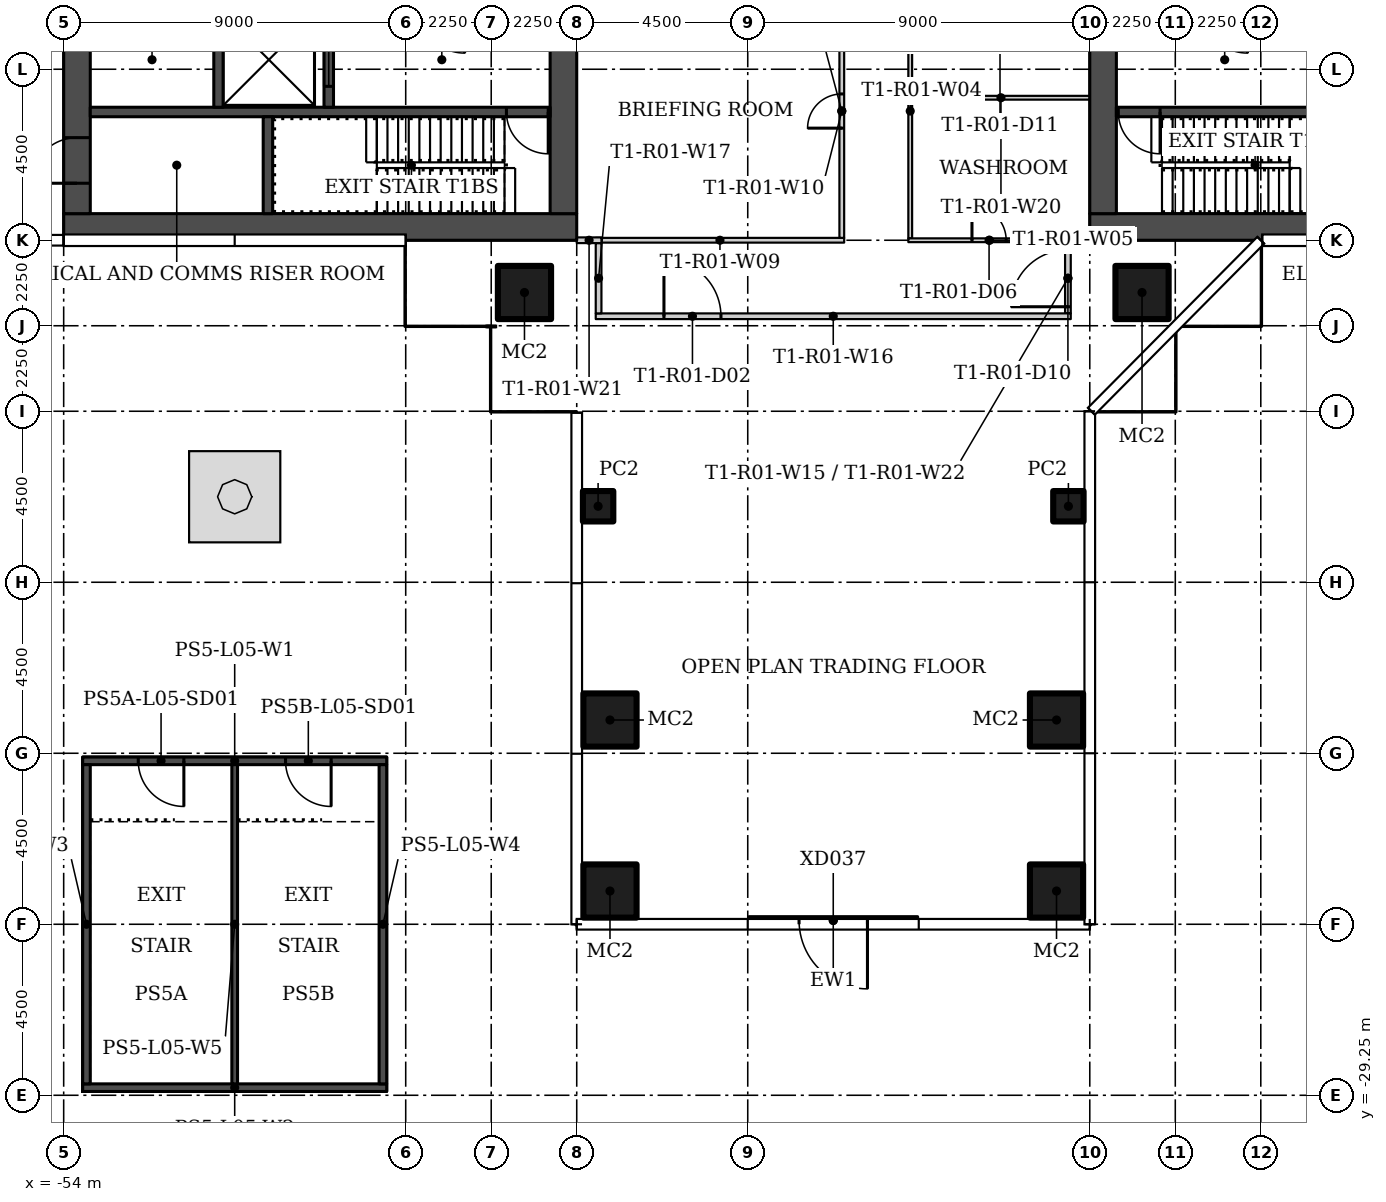
"""IFC4 building model, lengths in metres.
Left out: names, types, materials, properties, quantities, classifications, styles, units other than length and angle.
Written with IfcOpenShell. Run it as: python <this file> out.ifc"""

import sys

from ifc_helpers import new_model, si_unit, direction, frame, frame_2d, origin, origin_2d, place, context, subcontext, project, spatial, rectangle, hollow_rectangle, extrude, element, fill, save


model = new_model("IFC4")
c1 = context("Model", 3, precision=1e-05, world=origin(), true_north=direction((0.0, 1.0)))
c2 = subcontext(c1, "Body", "Model", "MODEL_VIEW")
j1 = project(units=[si_unit("LENGTHUNIT", "METRE"), si_unit("PLANEANGLEUNIT", "RADIAN")], contexts=[c1])
p1 = place(None, origin())
s1 = spatial("IfcSite", under=j1, at=p1, CompositionType="ELEMENT")
p2 = place(p1, origin())
s2 = spatial("IfcBuilding", under=s1, at=p2, CompositionType="ELEMENT")
p3 = place(p2, frame((0.0, 0.0, 28.5)))
s3 = spatial("IfcBuildingStorey", under=s2, at=p3, CompositionType="ELEMENT", Elevation=28.5)
for number, where in (
    (1, (-25.625, -8.125, 0.0)),
    (2, (-41.875, -8.125, 0.0)),
):
    element("IfcColumn", number, at=place(p3, frame(where)), inside=s3, PredefinedType="COLUMN", context=c2, shape_type="SweptSolid", body=[
        extrude(hollow_rectangle(XDim=1.4, YDim=1.4, WallThickness=0.05, at=origin_2d()), origin(), (0.0, 0.0, 1.0), 4.15),
    ])
p4 = place(p3, frame((-39.938, -13.75, 0.0)))
e3 = element("IfcColumn", 3, at=p4, inside=s3, PredefinedType="COLUMN", context=c2, shape_type="SweptSolid", body=[
    extrude(hollow_rectangle(XDim=0.8, YDim=0.8, WallThickness=0.025, at=origin_2d()), origin(), (0.0, 0.0, 1.0), 4.15),
])
for number, where in (
    (4, (-39.625, -19.375, 0.0)),
    (5, (-39.625, -23.875, 0.0)),
):
    element("IfcColumn", number, at=place(p3, frame(where)), inside=s3, PredefinedType="COLUMN", context=c2, shape_type="SweptSolid", body=[
        extrude(hollow_rectangle(XDim=1.4, YDim=1.4, WallThickness=0.05, at=origin_2d()), origin(), (0.0, 0.0, 1.0), 4.15),
    ])
p5 = place(p3, frame((-27.562, -13.75, 0.0)))
e6 = element("IfcColumn", 6, at=p5, inside=s3, PredefinedType="COLUMN", context=c2, shape_type="SweptSolid", body=[
    extrude(hollow_rectangle(XDim=0.8, YDim=0.8, WallThickness=0.025, at=origin_2d()), origin(), (0.0, 0.0, 1.0), 4.15),
])
for number, where in (
    (7, (-27.875, -19.375, 0.0)),
    (8, (-27.875, -23.875, 0.0)),
):
    element("IfcColumn", number, at=place(p3, frame(where)), inside=s3, PredefinedType="COLUMN", context=c2, shape_type="SweptSolid", body=[
        extrude(hollow_rectangle(XDim=1.4, YDim=1.4, WallThickness=0.05, at=origin_2d()), origin(), (0.0, 0.0, 1.0), 4.15),
    ])
p6 = place(p3, frame((-31.725, -0.0, 0.0), z_axis=(0.0, 0.0, 1.0), x_axis=(0.0, -1.0, 0.0)))
e9 = element("IfcWall", 9, at=p6, inside=s3, PredefinedType="PARTITIONING", context=c2, shape_type="SweptSolid", body=[
    extrude(rectangle(XDim=6.7, YDim=0.1, at=frame_2d((3.35, 0.0))), origin(), (0.0, 0.0, 1.0), 4.15),
])
p7 = place(p3, frame((-31.775, -6.75, 0.0)))
e10 = element("IfcWall", 10, at=p7, inside=s3, PredefinedType="PARTITIONING", context=c2, shape_type="SweptSolid", body=[
    extrude(rectangle(XDim=4.274, YDim=0.1, at=frame_2d((2.137, 0.0))), origin(), (0.0, 0.0, 1.0), 4.15),
])
p8 = place(p7, frame((1.675, 0.0, 0.0)))
e11 = element("IfcOpeningElement", 11, at=p8, cuts=e10, PredefinedType="OPENING", context=c2, shape_type="SweptSolid", body=[
    extrude(rectangle(XDim=0.9, YDim=2.1, at=frame_2d((0.45, 1.05))), frame((0.0, 0.06, 0.0), z_axis=(0.0, -1.0, 0.0), x_axis=(1.0, 0.0, 0.0)), (0.0, 0.0, 1.0), 0.12),
])
p9 = place(p3, frame((-40.0, -6.75, 0.0)))
e12 = element("IfcWall", 12, at=p9, inside=s3, PredefinedType="PARTITIONING", context=c2, shape_type="SweptSolid", body=[
    extrude(rectangle(XDim=6.537, YDim=0.125, at=frame_2d((3.269, 0.0))), origin(), (0.0, 0.0, 1.0), 4.15),
])
p10 = place(p3, frame((-33.525, -6.688, 0.0), z_axis=(0.0, 0.0, 1.0), x_axis=(0.0, 1.0, 0.0)))
e13 = element("IfcWall", 13, at=p10, inside=s3, PredefinedType="PARTITIONING", context=c2, shape_type="SweptSolid", body=[
    extrude(rectangle(XDim=6.675, YDim=0.125, at=frame_2d((3.337, 0.0))), origin(), (0.0, 0.0, 1.0), 4.15),
])
p11 = place(p10, frame((2.887, 0.0, 0.0)))
e14 = element("IfcOpeningElement", 14, at=p11, cuts=e13, PredefinedType="OPENING", context=c2, shape_type="SweptSolid", body=[
    extrude(rectangle(XDim=0.9, YDim=2.1, at=frame_2d((0.45, 1.05))), frame((0.0, 0.073, 0.0), z_axis=(0.0, -1.0, 0.0), x_axis=(1.0, 0.0, 0.0)), (0.0, 0.0, 1.0), 0.145),
])
p12 = place(p3, frame((-27.575, -8.675, 0.0), z_axis=(0.0, 0.0, 1.0), x_axis=(0.0, 1.0, 0.0)))
e15 = element("IfcWall", 15, at=p12, inside=s3, PredefinedType="PARTITIONING", context=c2, shape_type="SweptSolid", body=[
    extrude(rectangle(XDim=1.85, YDim=0.15, at=frame_2d((0.925, 0.0))), origin(), (0.0, 0.0, 1.0), 4.15),
])
p13 = place(p12, frame((0.175, 0.0, 0.0)))
e16 = element("IfcOpeningElement", 16, at=p13, cuts=e15, PredefinedType="OPENING", context=c2, shape_type="SweptSolid", body=[
    extrude(rectangle(XDim=1.5, YDim=2.4, at=frame_2d((0.75, 1.2))), frame((0.0, 0.085, 0.0), z_axis=(0.0, -1.0, 0.0), x_axis=(1.0, 0.0, 0.0)), (0.0, 0.0, 1.0), 0.17),
])
p14 = place(p3, frame((-40.0, -8.75, 0.0)))
e17 = element("IfcWall", 17, at=p14, inside=s3, PredefinedType="PARTITIONING", context=c2, shape_type="SweptSolid", body=[
    extrude(rectangle(XDim=12.5, YDim=0.15, at=frame_2d((6.25, 0.0))), origin(), (0.0, 0.0, 1.0), 4.15),
])
p15 = place(p14, frame((1.795, 0.0, 0.0)))
e18 = element("IfcOpeningElement", 18, at=p15, cuts=e17, PredefinedType="OPENING", context=c2, shape_type="SweptSolid", body=[
    extrude(rectangle(XDim=1.5, YDim=2.4, at=frame_2d((0.75, 1.2))), frame((0.0, 0.085, 0.0), z_axis=(0.0, -1.0, 0.0), x_axis=(1.0, 0.0, 0.0)), (0.0, 0.0, 1.0), 0.17),
])
p16 = place(p3, frame((-39.925, -6.825, 0.0), z_axis=(0.0, 0.0, 1.0), x_axis=(0.0, -1.0, 0.0)))
e19 = element("IfcWall", 19, at=p16, inside=s3, PredefinedType="PARTITIONING", context=c2, shape_type="SweptSolid", body=[
    extrude(rectangle(XDim=1.85, YDim=0.15, at=frame_2d((0.925, 0.0))), origin(), (0.0, 0.0, 1.0), 4.15),
])
p17 = place(p3, frame((-27.0, -3.0, 0.0), z_axis=(0.0, 0.0, 1.0), x_axis=(-1.0, 0.0, 0.0)))
e20 = element("IfcWall", 20, at=p17, inside=s3, PredefinedType="PARTITIONING", context=c2, shape_type="SweptSolid", body=[
    extrude(rectangle(XDim=4.675, YDim=0.1, at=frame_2d((2.337, 0.0))), origin(), (0.0, 0.0, 1.0), 4.15),
])
for number, where in (
    (21, (-40.5, -6.75, 0.0)),
    (22, (-27.65, -6.75, 0.0)),
):
    element("IfcWall", number, at=place(p3, frame(where)), inside=s3, PredefinedType="PARTITIONING", context=c2, shape_type="SweptSolid", body=[
        extrude(rectangle(XDim=0.65, YDim=0.15, at=frame_2d((0.325, 0.0))), origin(), (0.0, 0.0, 1.0), 4.15),
    ])
p18 = place(p3, frame((-31.53, -24.65, 0.0), z_axis=(0.0, 0.0, 1.0), x_axis=(-1.0, 0.0, 0.0)))
e23 = element("IfcWall", 23, at=p18, inside=s3, PredefinedType="SOLIDWALL", context=c2, shape_type="SweptSolid", body=[
    extrude(rectangle(XDim=4.44, YDim=0.2, at=frame_2d((2.22, 0.0))), origin(), (0.0, 0.0, 1.0), 3.0),
])
p19 = place(p18, frame((1.32, 0.0, 0.0)))
e24 = element("IfcOpeningElement", 24, at=p19, cuts=e23, PredefinedType="OPENING", context=c2, shape_type="SweptSolid", body=[
    extrude(rectangle(XDim=1.8, YDim=2.4, at=frame_2d((0.9, 1.2))), frame((0.0, 0.11, 0.0), z_axis=(0.0, -1.0, 0.0), x_axis=(1.0, 0.0, 0.0)), (0.0, 0.0, 1.0), 0.22),
])
p20 = place(p3, frame((-27.0, -6.4, 0.0)))
e25 = element("IfcWall", 25, at=p20, inside=s3, PredefinedType="SHEAR", context=c2, shape_type="SweptSolid", body=[
    extrude(rectangle(XDim=13.5, YDim=0.7, at=frame_2d((6.75, 0.0))), origin(), (0.0, 0.0, 1.0), 4.15),
])
p21 = place(p3, frame((-26.65, 6.05, 0.0), z_axis=(0.0, 0.0, 1.0), x_axis=(0.0, -1.0, 0.0)))
e26 = element("IfcWall", 26, at=p21, inside=s3, PredefinedType="SHEAR", context=c2, shape_type="SweptSolid", body=[
    extrude(rectangle(XDim=12.1, YDim=0.7, at=frame_2d((6.05, 0.0))), origin(), (0.0, 0.0, 1.0), 4.15),
])
p22 = place(p21, frame((3.9, 0.0, 0.0)))
e27 = element("IfcOpeningElement", 27, at=p22, cuts=e26, PredefinedType="OPENING", context=c2, shape_type="SweptSolid", body=[
    extrude(rectangle(XDim=1.8, YDim=2.4, at=frame_2d((0.9, 1.2))), frame((0.0, 0.36, 0.0), z_axis=(0.0, -1.0, 0.0), x_axis=(1.0, 0.0, 0.0)), (0.0, 0.0, 1.0), 0.72),
])
p23 = place(p3, frame((-14.2, -3.375, 0.0), z_axis=(0.0, 0.0, 1.0), x_axis=(-1.0, 0.0, 0.0)))
e28 = element("IfcWall", 28, at=p23, inside=s3, PredefinedType="SHEAR", context=c2, shape_type="SweptSolid", body=[
    extrude(rectangle(XDim=12.1, YDim=0.25, at=frame_2d((6.05, 0.0))), origin(), (0.0, 0.0, 1.0), 4.15),
])
p24 = place(p23, frame((10.95, 0.0, 0.0)))
e29 = element("IfcOpeningElement", 29, at=p24, cuts=e28, PredefinedType="OPENING", context=c2, shape_type="SweptSolid", body=[
    extrude(rectangle(XDim=1.1, YDim=2.1, at=frame_2d((0.55, 1.05))), frame((0.0, 0.135, 0.0), z_axis=(0.0, -1.0, 0.0), x_axis=(1.0, 0.0, 0.0)), (0.0, 0.0, 1.0), 0.27),
])
p25 = place(p3, frame((-40.5, -6.4, 0.0), z_axis=(0.0, 0.0, 1.0), x_axis=(-1.0, 0.0, 0.0)))
e30 = element("IfcWall", 30, at=p25, inside=s3, PredefinedType="SHEAR", context=c2, shape_type="SweptSolid", body=[
    extrude(rectangle(XDim=13.5, YDim=0.7, at=frame_2d((6.75, 0.0))), origin(), (0.0, 0.0, 1.0), 4.15),
])
p26 = place(p3, frame((-40.85, -6.05, 0.0), z_axis=(0.0, 0.0, 1.0), x_axis=(0.0, 1.0, 0.0)))
e31 = element("IfcWall", 31, at=p26, inside=s3, PredefinedType="SHEAR", context=c2, shape_type="SweptSolid", body=[
    extrude(rectangle(XDim=12.1, YDim=0.7, at=frame_2d((6.05, 0.0))), origin(), (0.0, 0.0, 1.0), 4.15),
])
p27 = place(p26, frame((6.4, 0.0, 0.0)))
e32 = element("IfcOpeningElement", 32, at=p27, cuts=e31, PredefinedType="OPENING", context=c2, shape_type="SweptSolid", body=[
    extrude(rectangle(XDim=1.8, YDim=2.4, at=frame_2d((0.9, 1.2))), frame((0.0, 0.36, 0.0), z_axis=(0.0, -1.0, 0.0), x_axis=(1.0, 0.0, 0.0)), (0.0, 0.0, 1.0), 0.72),
])
p28 = place(p3, frame((-53.65, -6.05, 0.0), z_axis=(0.0, 0.0, 1.0), x_axis=(0.0, 1.0, 0.0)))
e33 = element("IfcWall", 33, at=p28, inside=s3, PredefinedType="SHEAR", context=c2, shape_type="SweptSolid", body=[
    extrude(rectangle(XDim=12.1, YDim=0.7, at=frame_2d((6.05, 0.0))), origin(), (0.0, 0.0, 1.0), 4.15),
])
p29 = place(p28, frame((0.8, 0.0, 0.0)))
e34 = element("IfcOpeningElement", 34, at=p29, cuts=e33, PredefinedType="OPENING", context=c2, shape_type="SweptSolid", body=[
    extrude(rectangle(XDim=1.2, YDim=2.1, at=frame_2d((0.6, 1.05))), frame((0.0, 0.36, 0.0), z_axis=(0.0, -1.0, 0.0), x_axis=(1.0, 0.0, 0.0)), (0.0, 0.0, 1.0), 0.72),
])
p30 = place(p28, frame((6.4, 0.0, 0.0)))
e35 = element("IfcOpeningElement", 35, at=p30, cuts=e33, PredefinedType="OPENING", context=c2, shape_type="SweptSolid", body=[
    extrude(rectangle(XDim=1.8, YDim=2.4, at=frame_2d((0.9, 1.2))), frame((0.0, 0.36, 0.0), z_axis=(0.0, -1.0, 0.0), x_axis=(1.0, 0.0, 0.0)), (0.0, 0.0, 1.0), 0.72),
])
p31 = place(p3, frame((-41.2, -3.375, 0.0), z_axis=(0.0, 0.0, 1.0), x_axis=(-1.0, 0.0, 0.0)))
e36 = element("IfcWall", 36, at=p31, inside=s3, PredefinedType="SHEAR", context=c2, shape_type="SweptSolid", body=[
    extrude(rectangle(XDim=12.1, YDim=0.25, at=frame_2d((6.05, 0.0))), origin(), (0.0, 0.0, 1.0), 4.15),
])
p32 = place(p31, frame((0.05, 0.0, 0.0)))
e37 = element("IfcOpeningElement", 37, at=p32, cuts=e36, PredefinedType="OPENING", context=c2, shape_type="SweptSolid", body=[
    extrude(rectangle(XDim=1.1, YDim=2.1, at=frame_2d((0.55, 1.05))), frame((0.0, 0.135, 0.0), z_axis=(0.0, -1.0, 0.0), x_axis=(1.0, 0.0, 0.0)), (0.0, 0.0, 1.0), 0.27),
])
p33 = place(p3, frame((-48.625, -6.05, 0.0), z_axis=(0.0, 0.0, 1.0), x_axis=(0.0, 1.0, 0.0)))
e38 = element("IfcWall", 38, at=p33, inside=s3, PredefinedType="SHEAR", context=c2, shape_type="SweptSolid", body=[
    extrude(rectangle(XDim=2.55, YDim=0.25, at=frame_2d((1.275, 0.0))), origin(), (0.0, 0.0, 1.0), 4.15),
])
p34 = place(p3, frame((-47.025, -3.25, 0.0), z_axis=(0.0, 0.0, 1.0), x_axis=(0.0, 1.0, 0.0)))
e39 = element("IfcWall", 39, at=p34, inside=s3, PredefinedType="SHEAR", context=c2, shape_type="SweptSolid", body=[
    extrude(rectangle(XDim=2.5, YDim=0.25, at=frame_2d((1.25, 0.0))), origin(), (0.0, 0.0, 1.0), 4.15),
])
p35 = place(p34, frame((0.55, 0.0, 0.0)))
e40 = element("IfcOpeningElement", 40, at=p35, cuts=e39, PredefinedType="OPENING", context=c2, shape_type="SweptSolid", body=[
    extrude(rectangle(XDim=1.4, YDim=2.4, at=frame_2d((0.7, 1.2))), frame((0.0, 0.135, 0.0), z_axis=(0.0, -1.0, 0.0), x_axis=(1.0, 0.0, 0.0)), (0.0, 0.0, 1.0), 0.27),
])
p36 = place(p3, frame((-49.925, -3.25, 0.0), z_axis=(0.0, 0.0, 1.0), x_axis=(0.0, 1.0, 0.0)))
e41 = element("IfcWall", 41, at=p36, inside=s3, PredefinedType="SHEAR", context=c2, shape_type="SweptSolid", body=[
    extrude(rectangle(XDim=2.5, YDim=0.25, at=frame_2d((1.25, 0.0))), origin(), (0.0, 0.0, 1.0), 4.15),
])
p37 = place(p3, frame((-45.5, -20.45, 0.0), z_axis=(0.0, 0.0, 1.0), x_axis=(-1.0, 0.0, 0.0)))
e42 = element("IfcWall", 42, at=p37, inside=s3, PredefinedType="SHEAR", context=c2, shape_type="SweptSolid", body=[
    extrude(rectangle(XDim=8.0, YDim=0.2, at=frame_2d((4.0, 0.0))), origin(), (0.0, 0.0, 1.0), 2.8),
])
p38 = place(p37, frame((5.337, 0.0, 0.0)))
e43 = element("IfcOpeningElement", 43, at=p38, cuts=e42, PredefinedType="OPENING", context=c2, shape_type="SweptSolid", body=[
    extrude(rectangle(XDim=1.2, YDim=2.4, at=frame_2d((0.6, 1.2))), frame((0.0, 0.11, 0.0), z_axis=(0.0, -1.0, 0.0), x_axis=(1.0, 0.0, 0.0)), (0.0, 0.0, 1.0), 0.22),
])
p39 = place(p37, frame((1.462, 0.0, 0.0)))
e44 = element("IfcOpeningElement", 44, at=p39, cuts=e42, PredefinedType="OPENING", context=c2, shape_type="SweptSolid", body=[
    extrude(rectangle(XDim=1.2, YDim=2.4, at=frame_2d((0.6, 1.2))), frame((0.0, 0.11, 0.0), z_axis=(0.0, -1.0, 0.0), x_axis=(1.0, 0.0, 0.0)), (0.0, 0.0, 1.0), 0.22),
])
p40 = place(p3, frame((-53.5, -29.05, 0.0)))
e45 = element("IfcWall", 45, at=p40, inside=s3, PredefinedType="SHEAR", context=c2, shape_type="SweptSolid", body=[
    extrude(rectangle(XDim=8.0, YDim=0.2, at=frame_2d((4.0, 0.0))), origin(), (0.0, 0.0, 1.0), 2.8),
])
for number, where, z_axis, x_axis in (
    (46, (-53.4, -28.95, 0.0), (0.0, 0.0, 1.0), (0.0, 1.0, 0.0)),
    (47, (-45.6, -28.95, 0.0), (0.0, 0.0, 1.0), (0.0, 1.0, 0.0)),
):
    element("IfcWall", number, at=place(p3, frame(where, z_axis=z_axis, x_axis=x_axis)), inside=s3, PredefinedType="SHEAR", context=c2, shape_type="SweptSolid", body=[
        extrude(rectangle(XDim=8.4, YDim=0.2, at=frame_2d((4.2, 0.0))), origin(), (0.0, 0.0, 1.0), 2.8),
    ])
p41 = place(p3, frame((-49.5, -28.95, 0.0), z_axis=(0.0, 0.0, 1.0), x_axis=(0.0, 1.0, 0.0)))
e48 = element("IfcWall", 48, at=p41, inside=s3, PredefinedType="SHEAR", context=c2, shape_type="SweptSolid", body=[
    extrude(rectangle(XDim=8.4, YDim=0.15, at=frame_2d((4.2, 0.0))), origin(), (0.0, 0.0, 1.0), 2.8),
])
p42 = place(p15, origin())
e49 = element("IfcDoor", 49, at=p42, inside=s3, OperationType="DOUBLE_DOOR_SINGLE_SWING", PredefinedType="DOOR", context=c2, shape_type="SweptSolid", body=[
    extrude(rectangle(XDim=1.5, YDim=2.4, at=frame_2d((0.75, 1.2))), frame((0.0, 0.025, 0.0), z_axis=(0.0, -1.0, 0.0), x_axis=(1.0, 0.0, 0.0)), (0.0, 0.0, 1.0), 0.05),
])
fill(e18, e49)
p43 = place(p11, origin())
e50 = element("IfcDoor", 50, at=p43, inside=s3, OperationType="SINGLE_SWING_RIGHT", PredefinedType="DOOR", context=c2, shape_type="SweptSolid", body=[
    extrude(rectangle(XDim=0.9, YDim=2.1, at=frame_2d((0.45, 1.05))), frame((0.0, 0.025, 0.0), z_axis=(0.0, -1.0, 0.0), x_axis=(1.0, 0.0, 0.0)), (0.0, 0.0, 1.0), 0.05),
])
fill(e14, e50)
p44 = place(p8, origin())
e51 = element("IfcDoor", 51, at=p44, inside=s3, OperationType="SINGLE_SWING_RIGHT", PredefinedType="DOOR", context=c2, shape_type="SweptSolid", body=[
    extrude(rectangle(XDim=0.9, YDim=2.1, at=frame_2d((0.45, 1.05))), frame((0.0, 0.025, 0.0), z_axis=(0.0, -1.0, 0.0), x_axis=(1.0, 0.0, 0.0)), (0.0, 0.0, 1.0), 0.05),
])
fill(e11, e51)
p45 = place(p13, origin())
e52 = element("IfcDoor", 52, at=p45, inside=s3, OperationType="DOUBLE_DOOR_SINGLE_SWING", PredefinedType="DOOR", context=c2, shape_type="SweptSolid", body=[
    extrude(rectangle(XDim=1.5, YDim=2.4, at=frame_2d((0.75, 1.2))), frame((0.0, 0.025, 0.0), z_axis=(0.0, -1.0, 0.0), x_axis=(1.0, 0.0, 0.0)), (0.0, 0.0, 1.0), 0.05),
])
fill(e16, e52)
p46 = place(p19, origin())
e53 = element("IfcDoor", 53, at=p46, inside=s3, OperationType="DOUBLE_DOOR_SINGLE_SWING", PredefinedType="DOOR", context=c2, shape_type="SweptSolid", body=[
    extrude(rectangle(XDim=1.8, YDim=2.4, at=frame_2d((0.9, 1.2))), frame((0.0, 0.025, 0.0), z_axis=(0.0, -1.0, 0.0), x_axis=(1.0, 0.0, 0.0)), (0.0, 0.0, 1.0), 0.05),
])
fill(e24, e53)
p47 = place(p24, origin())
e54 = element("IfcDoor", 54, at=p47, inside=s3, OperationType="SINGLE_SWING_RIGHT", PredefinedType="DOOR", context=c2, shape_type="SweptSolid", body=[
    extrude(rectangle(XDim=1.1, YDim=2.1, at=frame_2d((0.55, 1.05))), frame((0.0, 0.025, 0.0), z_axis=(0.0, -1.0, 0.0), x_axis=(1.0, 0.0, 0.0)), (0.0, 0.0, 1.0), 0.05),
])
fill(e29, e54)
p48 = place(p29, origin())
e55 = element("IfcDoor", 55, at=p48, inside=s3, OperationType="SINGLE_SWING_LEFT", PredefinedType="DOOR", context=c2, shape_type="SweptSolid", body=[
    extrude(rectangle(XDim=1.2, YDim=2.1, at=frame_2d((0.6, 1.05))), frame((0.0, 0.025, 0.0), z_axis=(0.0, -1.0, 0.0), x_axis=(1.0, 0.0, 0.0)), (0.0, 0.0, 1.0), 0.05),
])
fill(e34, e55)
p49 = place(p32, origin())
e56 = element("IfcDoor", 56, at=p49, inside=s3, OperationType="SINGLE_SWING_LEFT", PredefinedType="DOOR", context=c2, shape_type="SweptSolid", body=[
    extrude(rectangle(XDim=1.1, YDim=2.1, at=frame_2d((0.55, 1.05))), frame((0.0, 0.025, 0.0), z_axis=(0.0, -1.0, 0.0), x_axis=(1.0, 0.0, 0.0)), (0.0, 0.0, 1.0), 0.05),
])
fill(e37, e56)
p50 = place(p35, origin())
e57 = element("IfcDoor", 57, at=p50, inside=s3, OperationType="SLIDING_TO_LEFT", PredefinedType="DOOR", context=c2, shape_type="SweptSolid", body=[
    extrude(rectangle(XDim=1.4, YDim=2.4, at=frame_2d((0.7, 1.2))), frame((0.0, 0.025, 0.0), z_axis=(0.0, -1.0, 0.0), x_axis=(1.0, 0.0, 0.0)), (0.0, 0.0, 1.0), 0.05),
])
fill(e40, e57)
p51 = place(p38, origin())
e58 = element("IfcDoor", 58, at=p51, inside=s3, OperationType="SINGLE_SWING_LEFT", PredefinedType="DOOR", context=c2, shape_type="SweptSolid", body=[
    extrude(rectangle(XDim=1.2, YDim=2.4, at=frame_2d((0.6, 1.2))), frame((0.0, 0.025, 0.0), z_axis=(0.0, -1.0, 0.0), x_axis=(1.0, 0.0, 0.0)), (0.0, 0.0, 1.0), 0.05),
])
fill(e43, e58)
p52 = place(p39, origin())
e59 = element("IfcDoor", 59, at=p52, inside=s3, OperationType="SINGLE_SWING_RIGHT", PredefinedType="DOOR", context=c2, shape_type="SweptSolid", body=[
    extrude(rectangle(XDim=1.2, YDim=2.4, at=frame_2d((0.6, 1.2))), frame((0.0, 0.025, 0.0), z_axis=(0.0, -1.0, 0.0), x_axis=(1.0, 0.0, 0.0)), (0.0, 0.0, 1.0), 0.05),
])
fill(e44, e59)
save(model, sys.argv[1])
